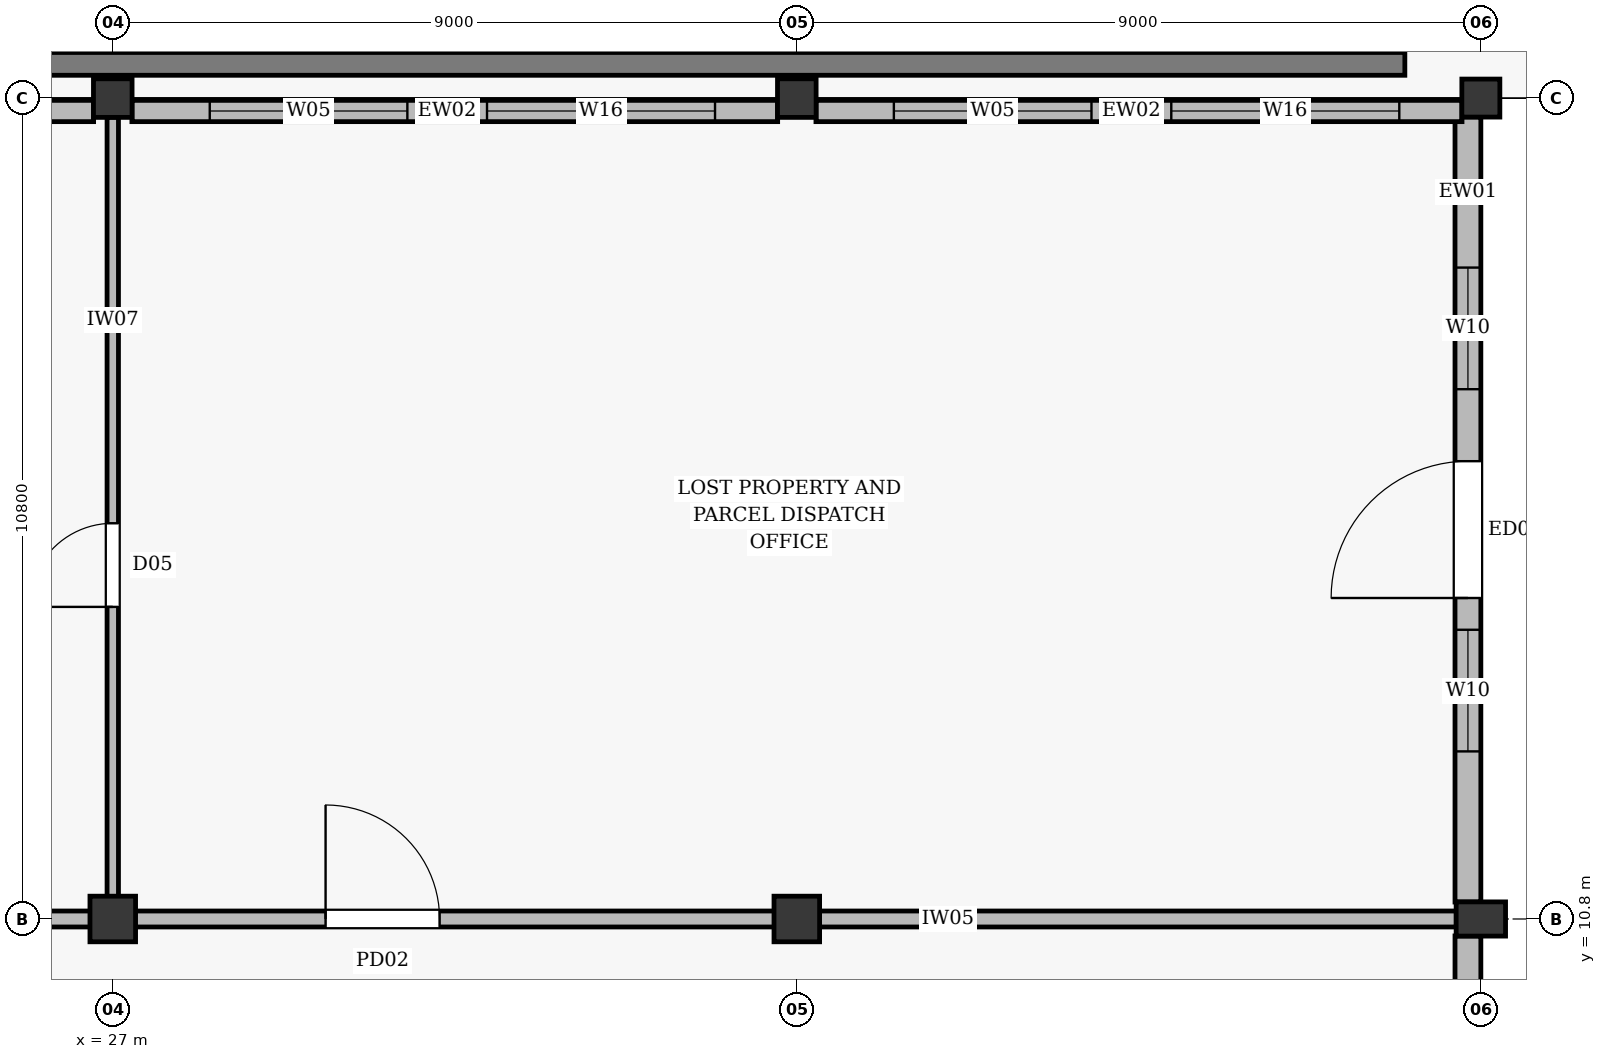
"""IFC4 building model, lengths in metres.
Left out: names, types, materials, properties, quantities, classifications, styles, units other than length and angle.
Written with IfcOpenShell. Run it as: python <this file> out.ifc"""

import sys

from ifc_helpers import new_model, si_unit, direction, frame, frame_2d, origin, origin_2d, place, context, subcontext, project, spatial, rectangle, hollow_rectangle, hollow_circle, extrude, element, fill, save


model = new_model("IFC4")
c1 = context("Model", 3, precision=1e-05, world=origin(), true_north=direction((0.0, 1.0)))
c2 = subcontext(c1, "Body", "Model", "MODEL_VIEW")
j1 = project(units=[si_unit("LENGTHUNIT", "METRE"), si_unit("PLANEANGLEUNIT", "RADIAN")], contexts=[c1])
p1 = place(None, origin())
s1 = spatial("IfcSite", under=j1, at=p1, CompositionType="ELEMENT")
p2 = place(p1, origin())
s2 = spatial("IfcBuilding", under=s1, at=p2, CompositionType="ELEMENT")
p3 = place(p2, origin())
s3 = spatial("IfcBuildingStorey", under=s2, at=p3, CompositionType="ELEMENT", Elevation=0.0)
for number, where, z_axis, x_axis in (
    (1, (27.0, 21.6, 0.0), (0.0, 0.0, 1.0), (1.0, 0.0, 0.0)),
    (2, (36.0, 21.6, 0.0), (0.0, 0.0, 1.0), (1.0, 0.0, 0.0)),
):
    element("IfcColumn", number, at=place(p3, frame(where, z_axis=z_axis, x_axis=x_axis)), inside=s3, PredefinedType="COLUMN", context=c2, shape_type="SweptSolid", body=[
        extrude(hollow_circle(Radius=0.254, WallThickness=0.016, at=origin_2d()), origin(), (0.0, 0.0, 1.0), 6.6),
    ])
p4 = place(p3, frame((45.0, 21.6, 0.0), z_axis=(0.0, 0.0, 1.0), x_axis=(1.0, 0.0, 0.0)))
e3 = element("IfcColumn", 3, at=p4, inside=s3, PredefinedType="COLUMN", context=c2, shape_type="SweptSolid", body=[
    extrude(hollow_rectangle(XDim=0.5, YDim=0.5, WallThickness=0.02, at=origin_2d()), origin(), (0.0, 0.0, 1.0), 6.6),
])
for number, where, z_axis, x_axis in (
    (4, (27.0, 10.8, 0.0), (0.0, 0.0, 1.0), (1.0, 0.0, 0.0)),
    (5, (36.0, 10.8, 0.0), (0.0, 0.0, 1.0), (1.0, 0.0, 0.0)),
):
    element("IfcColumn", number, at=place(p3, frame(where, z_axis=z_axis, x_axis=x_axis)), inside=s3, PredefinedType="COLUMN", context=c2, shape_type="SweptSolid", body=[
        extrude(rectangle(XDim=0.6, YDim=0.6, at=origin_2d()), origin(), (0.0, 0.0, 1.0), 6.6),
    ])
p5 = place(p3, frame((45.0, 10.8, 0.0), z_axis=(0.0, 0.0, 1.0), x_axis=(1.0, 0.0, 0.0)))
e6 = element("IfcColumn", 6, at=p5, inside=s3, PredefinedType="PILASTER", context=c2, shape_type="SweptSolid", body=[
    extrude(rectangle(XDim=0.65, YDim=0.45, at=origin_2d()), origin(), (0.0, 0.0, 1.0), 6.6),
])
p6 = place(p3, frame((7.0, 22.05, 0.0), z_axis=(0.0, 0.0, 1.0), x_axis=(1.0, 0.0, 0.0)))
e7 = element("IfcWall", 7, at=p6, inside=s3, PredefinedType="SOLIDWALL", context=c2, shape_type="SweptSolid", body=[
    extrude(rectangle(XDim=37.0, YDim=0.3, at=frame_2d((18.5, 0.0))), origin(), (0.0, 0.0, 1.0), 0.375),
])
p7 = place(p3, frame((44.83, 0.223, 0.0), z_axis=(0.0, 0.0, 1.0), x_axis=(0.0, 1.0, 0.0)))
e8 = element("IfcWall", 8, at=p7, inside=s3, PredefinedType="STANDARD", context=c2, shape_type="SweptSolid", body=[
    extrude(rectangle(XDim=10.354, YDim=0.34, at=frame_2d((5.177, 0.0))), origin(), (0.0, 0.0, 1.0), 5.55),
])
p8 = place(p7, frame((1.988, 0.0, 0.75)))
e9 = element("IfcOpeningElement", 9, at=p8, cuts=e8, PredefinedType="OPENING", context=c2, shape_type="SweptSolid", body=[
    extrude(rectangle(XDim=1.6, YDim=2.1, at=frame_2d((0.8, 1.05))), frame((0.0, 0.182, 0.0), z_axis=(0.0, -1.0, 0.0), x_axis=(1.0, 0.0, 0.0)), (0.0, 0.0, 1.0), 0.364),
])
p9 = place(p7, frame((6.765, 0.0, 0.75)))
e10 = element("IfcOpeningElement", 10, at=p9, cuts=e8, PredefinedType="OPENING", context=c2, shape_type="SweptSolid", body=[
    extrude(rectangle(XDim=1.6, YDim=2.1, at=frame_2d((0.8, 1.05))), frame((0.0, 0.182, 0.0), z_axis=(0.0, -1.0, 0.0), x_axis=(1.0, 0.0, 0.0)), (0.0, 0.0, 1.0), 0.364),
])
p10 = place(p3, frame((44.83, 11.023, 0.0), z_axis=(0.0, 0.0, 1.0), x_axis=(0.0, 1.0, 0.0)))
e11 = element("IfcWall", 11, at=p10, inside=s3, PredefinedType="STANDARD", context=c2, shape_type="SweptSolid", body=[
    extrude(rectangle(XDim=10.329, YDim=0.34, at=frame_2d((5.165, 0.0))), origin(), (0.0, 0.0, 1.0), 5.55),
])
p11 = place(p10, frame((4.0, 0.0, 0.005)))
e12 = element("IfcOpeningElement", 12, at=p11, cuts=e11, PredefinedType="OPENING", context=c2, shape_type="SweptSolid", body=[
    extrude(rectangle(XDim=1.8, YDim=2.35, at=frame_2d((0.9, 1.175))), frame((0.0, 0.182, 0.0), z_axis=(0.0, -1.0, 0.0), x_axis=(1.0, 0.0, 0.0)), (0.0, 0.0, 1.0), 0.364),
])
p12 = place(p10, frame((1.982, 0.0, 0.75)))
e13 = element("IfcOpeningElement", 13, at=p12, cuts=e11, PredefinedType="OPENING", context=c2, shape_type="SweptSolid", body=[
    extrude(rectangle(XDim=1.6, YDim=2.1, at=frame_2d((0.8, 1.05))), frame((0.0, 0.182, 0.0), z_axis=(0.0, -1.0, 0.0), x_axis=(1.0, 0.0, 0.0)), (0.0, 0.0, 1.0), 0.364),
])
p13 = place(p10, frame((6.747, 0.0, 0.75)))
e14 = element("IfcOpeningElement", 14, at=p13, cuts=e11, PredefinedType="OPENING", context=c2, shape_type="SweptSolid", body=[
    extrude(rectangle(XDim=1.6, YDim=2.1, at=frame_2d((0.8, 1.05))), frame((0.0, 0.182, 0.0), z_axis=(0.0, -1.0, 0.0), x_axis=(1.0, 0.0, 0.0)), (0.0, 0.0, 1.0), 0.364),
])
p14 = place(p3, frame((18.252, 21.43, 0.0), z_axis=(0.0, 0.0, 1.0), x_axis=(1.0, 0.0, 0.0)))
e15 = element("IfcWall", 15, at=p14, inside=s3, PredefinedType="STANDARD", context=c2, shape_type="SweptSolid", body=[
    extrude(rectangle(XDim=8.496, YDim=0.28, at=frame_2d((4.248, 0.0))), origin(), (0.0, 0.0, 1.0), 5.55),
])
p15 = place(p14, frame((1.024, 0.0, 0.75)))
e16 = element("IfcOpeningElement", 16, at=p15, cuts=e15, PredefinedType="OPENING", context=c2, shape_type="SweptSolid", body=[
    extrude(rectangle(XDim=2.6, YDim=2.4, at=frame_2d((1.3, 1.2))), frame((0.0, 0.152, 0.0), z_axis=(0.0, -1.0, 0.0), x_axis=(1.0, 0.0, 0.0)), (0.0, 0.0, 1.0), 0.304),
])
p16 = place(p14, frame((4.672, 0.0, 1.05)))
e17 = element("IfcOpeningElement", 17, at=p16, cuts=e15, PredefinedType="OPENING", context=c2, shape_type="SweptSolid", body=[
    extrude(rectangle(XDim=3.0, YDim=1.2, at=frame_2d((1.5, 0.6))), frame((0.0, 0.152, 0.0), z_axis=(0.0, -1.0, 0.0), x_axis=(1.0, 0.0, 0.0)), (0.0, 0.0, 1.0), 0.304),
])
p17 = place(p3, frame((27.252, 21.43, 0.0), z_axis=(0.0, 0.0, 1.0), x_axis=(1.0, 0.0, 0.0)))
e18 = element("IfcWall", 18, at=p17, inside=s3, PredefinedType="STANDARD", context=c2, shape_type="SweptSolid", body=[
    extrude(rectangle(XDim=8.496, YDim=0.28, at=frame_2d((4.248, 0.0))), origin(), (0.0, 0.0, 1.0), 5.55),
])
p18 = place(p17, frame((1.024, 0.0, 0.75)))
e19 = element("IfcOpeningElement", 19, at=p18, cuts=e18, PredefinedType="OPENING", context=c2, shape_type="SweptSolid", body=[
    extrude(rectangle(XDim=2.6, YDim=2.4, at=frame_2d((1.3, 1.2))), frame((0.0, 0.152, 0.0), z_axis=(0.0, -1.0, 0.0), x_axis=(1.0, 0.0, 0.0)), (0.0, 0.0, 1.0), 0.304),
])
p19 = place(p17, frame((4.672, 0.0, 1.05)))
e20 = element("IfcOpeningElement", 20, at=p19, cuts=e18, PredefinedType="OPENING", context=c2, shape_type="SweptSolid", body=[
    extrude(rectangle(XDim=3.0, YDim=1.2, at=frame_2d((1.5, 0.6))), frame((0.0, 0.152, 0.0), z_axis=(0.0, -1.0, 0.0), x_axis=(1.0, 0.0, 0.0)), (0.0, 0.0, 1.0), 0.304),
])
p20 = place(p3, frame((36.252, 21.43, 0.0), z_axis=(0.0, 0.0, 1.0), x_axis=(1.0, 0.0, 0.0)))
e21 = element("IfcWall", 21, at=p20, inside=s3, PredefinedType="STANDARD", context=c2, shape_type="SweptSolid", body=[
    extrude(rectangle(XDim=8.5, YDim=0.28, at=frame_2d((4.25, 0.0))), origin(), (0.0, 0.0, 1.0), 5.55),
])
p21 = place(p20, frame((1.025, 0.0, 0.75)))
e22 = element("IfcOpeningElement", 22, at=p21, cuts=e21, PredefinedType="OPENING", context=c2, shape_type="SweptSolid", body=[
    extrude(rectangle(XDim=2.6, YDim=2.4, at=frame_2d((1.3, 1.2))), frame((0.0, 0.152, 0.0), z_axis=(0.0, -1.0, 0.0), x_axis=(1.0, 0.0, 0.0)), (0.0, 0.0, 1.0), 0.304),
])
p22 = place(p20, frame((4.675, 0.0, 1.05)))
e23 = element("IfcOpeningElement", 23, at=p22, cuts=e21, PredefinedType="OPENING", context=c2, shape_type="SweptSolid", body=[
    extrude(rectangle(XDim=3.0, YDim=1.2, at=frame_2d((1.5, 0.6))), frame((0.0, 0.152, 0.0), z_axis=(0.0, -1.0, 0.0), x_axis=(1.0, 0.0, 0.0)), (0.0, 0.0, 1.0), 0.304),
])
p23 = place(p3, frame((18.298, 10.8, 0.0), z_axis=(0.0, 0.0, 1.0), x_axis=(1.0, 0.0, 0.0)))
e24 = element("IfcWall", 24, at=p23, inside=s3, PredefinedType="PARTITIONING", context=c2, shape_type="SweptSolid", body=[
    extrude(rectangle(XDim=26.379, YDim=0.21, at=frame_2d((13.189, 0.0))), origin(), (0.0, 0.0, 1.0), 5.93),
])
p24 = place(p23, frame((11.502, 0.0, 0.005)))
e25 = element("IfcOpeningElement", 25, at=p24, cuts=e24, PredefinedType="OPENING", context=c2, shape_type="SweptSolid", body=[
    extrude(rectangle(XDim=1.5, YDim=2.25, at=frame_2d((0.75, 1.125))), frame((0.0, 0.117, 0.0), z_axis=(0.0, -1.0, 0.0), x_axis=(1.0, 0.0, 0.0)), (0.0, 0.0, 1.0), 0.234),
])
p25 = place(p3, frame((27.0, 10.903, 0.0), z_axis=(0.0, 0.0, 1.0), x_axis=(0.0, 1.0, 0.0)))
e26 = element("IfcWall", 26, at=p25, inside=s3, PredefinedType="PARTITIONING", context=c2, shape_type="SweptSolid", body=[
    extrude(rectangle(XDim=10.445, YDim=0.15, at=frame_2d((5.222, 0.0))), origin(), (0.0, 0.0, 1.0), 5.57),
])
p26 = place(p25, frame((4.003, 0.0, 0.005)))
e27 = element("IfcOpeningElement", 27, at=p26, cuts=e26, PredefinedType="OPENING", context=c2, shape_type="SweptSolid", body=[
    extrude(rectangle(XDim=1.1, YDim=2.1, at=frame_2d((0.55, 1.05))), frame((0.0, 0.087, 0.0), z_axis=(0.0, -1.0, 0.0), x_axis=(1.0, 0.0, 0.0)), (0.0, 0.0, 1.0), 0.174),
])
p27 = place(p11, origin())
e28 = element("IfcDoor", 28, at=p27, inside=s3, OperationType="SINGLE_SWING_LEFT", PredefinedType="DOOR", context=c2, shape_type="SweptSolid", body=[
    extrude(rectangle(XDim=1.8, YDim=2.35, at=frame_2d((0.9, 1.175))), frame((0.0, 0.025, 0.0), z_axis=(0.0, -1.0, 0.0), x_axis=(1.0, 0.0, 0.0)), (0.0, 0.0, 1.0), 0.05),
])
fill(e12, e28)
p28 = place(p12, origin())
e29 = element("IfcWindow", 29, at=p28, inside=s3, PartitioningType="DOUBLE_PANEL_VERTICAL", PredefinedType="WINDOW", context=c2, shape_type="SweptSolid", body=[
    extrude(rectangle(XDim=1.6, YDim=2.1, at=frame_2d((0.8, 1.05))), frame((0.0, 0.03, 0.0), z_axis=(0.0, -1.0, 0.0), x_axis=(1.0, 0.0, 0.0)), (0.0, 0.0, 1.0), 0.06),
])
fill(e13, e29)
p29 = place(p13, origin())
e30 = element("IfcWindow", 30, at=p29, inside=s3, PartitioningType="DOUBLE_PANEL_VERTICAL", PredefinedType="WINDOW", context=c2, shape_type="SweptSolid", body=[
    extrude(rectangle(XDim=1.6, YDim=2.1, at=frame_2d((0.8, 1.05))), frame((0.0, 0.03, 0.0), z_axis=(0.0, -1.0, 0.0), x_axis=(1.0, 0.0, 0.0)), (0.0, 0.0, 1.0), 0.06),
])
fill(e14, e30)
p30 = place(p18, origin())
e31 = element("IfcWindow", 31, at=p30, inside=s3, PartitioningType="DOUBLE_PANEL_VERTICAL", PredefinedType="WINDOW", context=c2, shape_type="SweptSolid", body=[
    extrude(rectangle(XDim=2.6, YDim=2.4, at=frame_2d((1.3, 1.2))), frame((0.0, 0.03, 0.0), z_axis=(0.0, -1.0, 0.0), x_axis=(1.0, 0.0, 0.0)), (0.0, 0.0, 1.0), 0.06),
])
fill(e19, e31)
p31 = place(p19, origin())
e32 = element("IfcWindow", 32, at=p31, inside=s3, PartitioningType="DOUBLE_PANEL_VERTICAL", PredefinedType="WINDOW", context=c2, shape_type="SweptSolid", body=[
    extrude(rectangle(XDim=3.0, YDim=1.2, at=frame_2d((1.5, 0.6))), frame((0.0, 0.03, 0.0), z_axis=(0.0, -1.0, 0.0), x_axis=(1.0, 0.0, 0.0)), (0.0, 0.0, 1.0), 0.06),
])
fill(e20, e32)
p32 = place(p21, origin())
e33 = element("IfcWindow", 33, at=p32, inside=s3, PartitioningType="DOUBLE_PANEL_VERTICAL", PredefinedType="WINDOW", context=c2, shape_type="SweptSolid", body=[
    extrude(rectangle(XDim=2.6, YDim=2.4, at=frame_2d((1.3, 1.2))), frame((0.0, 0.03, 0.0), z_axis=(0.0, -1.0, 0.0), x_axis=(1.0, 0.0, 0.0)), (0.0, 0.0, 1.0), 0.06),
])
fill(e22, e33)
p33 = place(p22, origin())
e34 = element("IfcWindow", 34, at=p33, inside=s3, PartitioningType="DOUBLE_PANEL_VERTICAL", PredefinedType="WINDOW", context=c2, shape_type="SweptSolid", body=[
    extrude(rectangle(XDim=3.0, YDim=1.2, at=frame_2d((1.5, 0.6))), frame((0.0, 0.03, 0.0), z_axis=(0.0, -1.0, 0.0), x_axis=(1.0, 0.0, 0.0)), (0.0, 0.0, 1.0), 0.06),
])
fill(e23, e34)
p34 = place(p24, origin())
e35 = element("IfcDoor", 35, at=p34, inside=s3, OperationType="SINGLE_SWING_LEFT", PredefinedType="DOOR", context=c2, shape_type="SweptSolid", body=[
    extrude(rectangle(XDim=1.5, YDim=2.25, at=frame_2d((0.75, 1.125))), frame((0.0, 0.025, 0.0), z_axis=(0.0, -1.0, 0.0), x_axis=(1.0, 0.0, 0.0)), (0.0, 0.0, 1.0), 0.05),
])
fill(e25, e35)
p35 = place(p26, origin())
e36 = element("IfcDoor", 36, at=p35, inside=s3, OperationType="SINGLE_SWING_LEFT", PredefinedType="DOOR", context=c2, shape_type="SweptSolid", body=[
    extrude(rectangle(XDim=1.1, YDim=2.1, at=frame_2d((0.55, 1.05))), frame((0.0, 0.025, 0.0), z_axis=(0.0, -1.0, 0.0), x_axis=(1.0, 0.0, 0.0)), (0.0, 0.0, 1.0), 0.05),
])
fill(e27, e36)
save(model, sys.argv[1])
